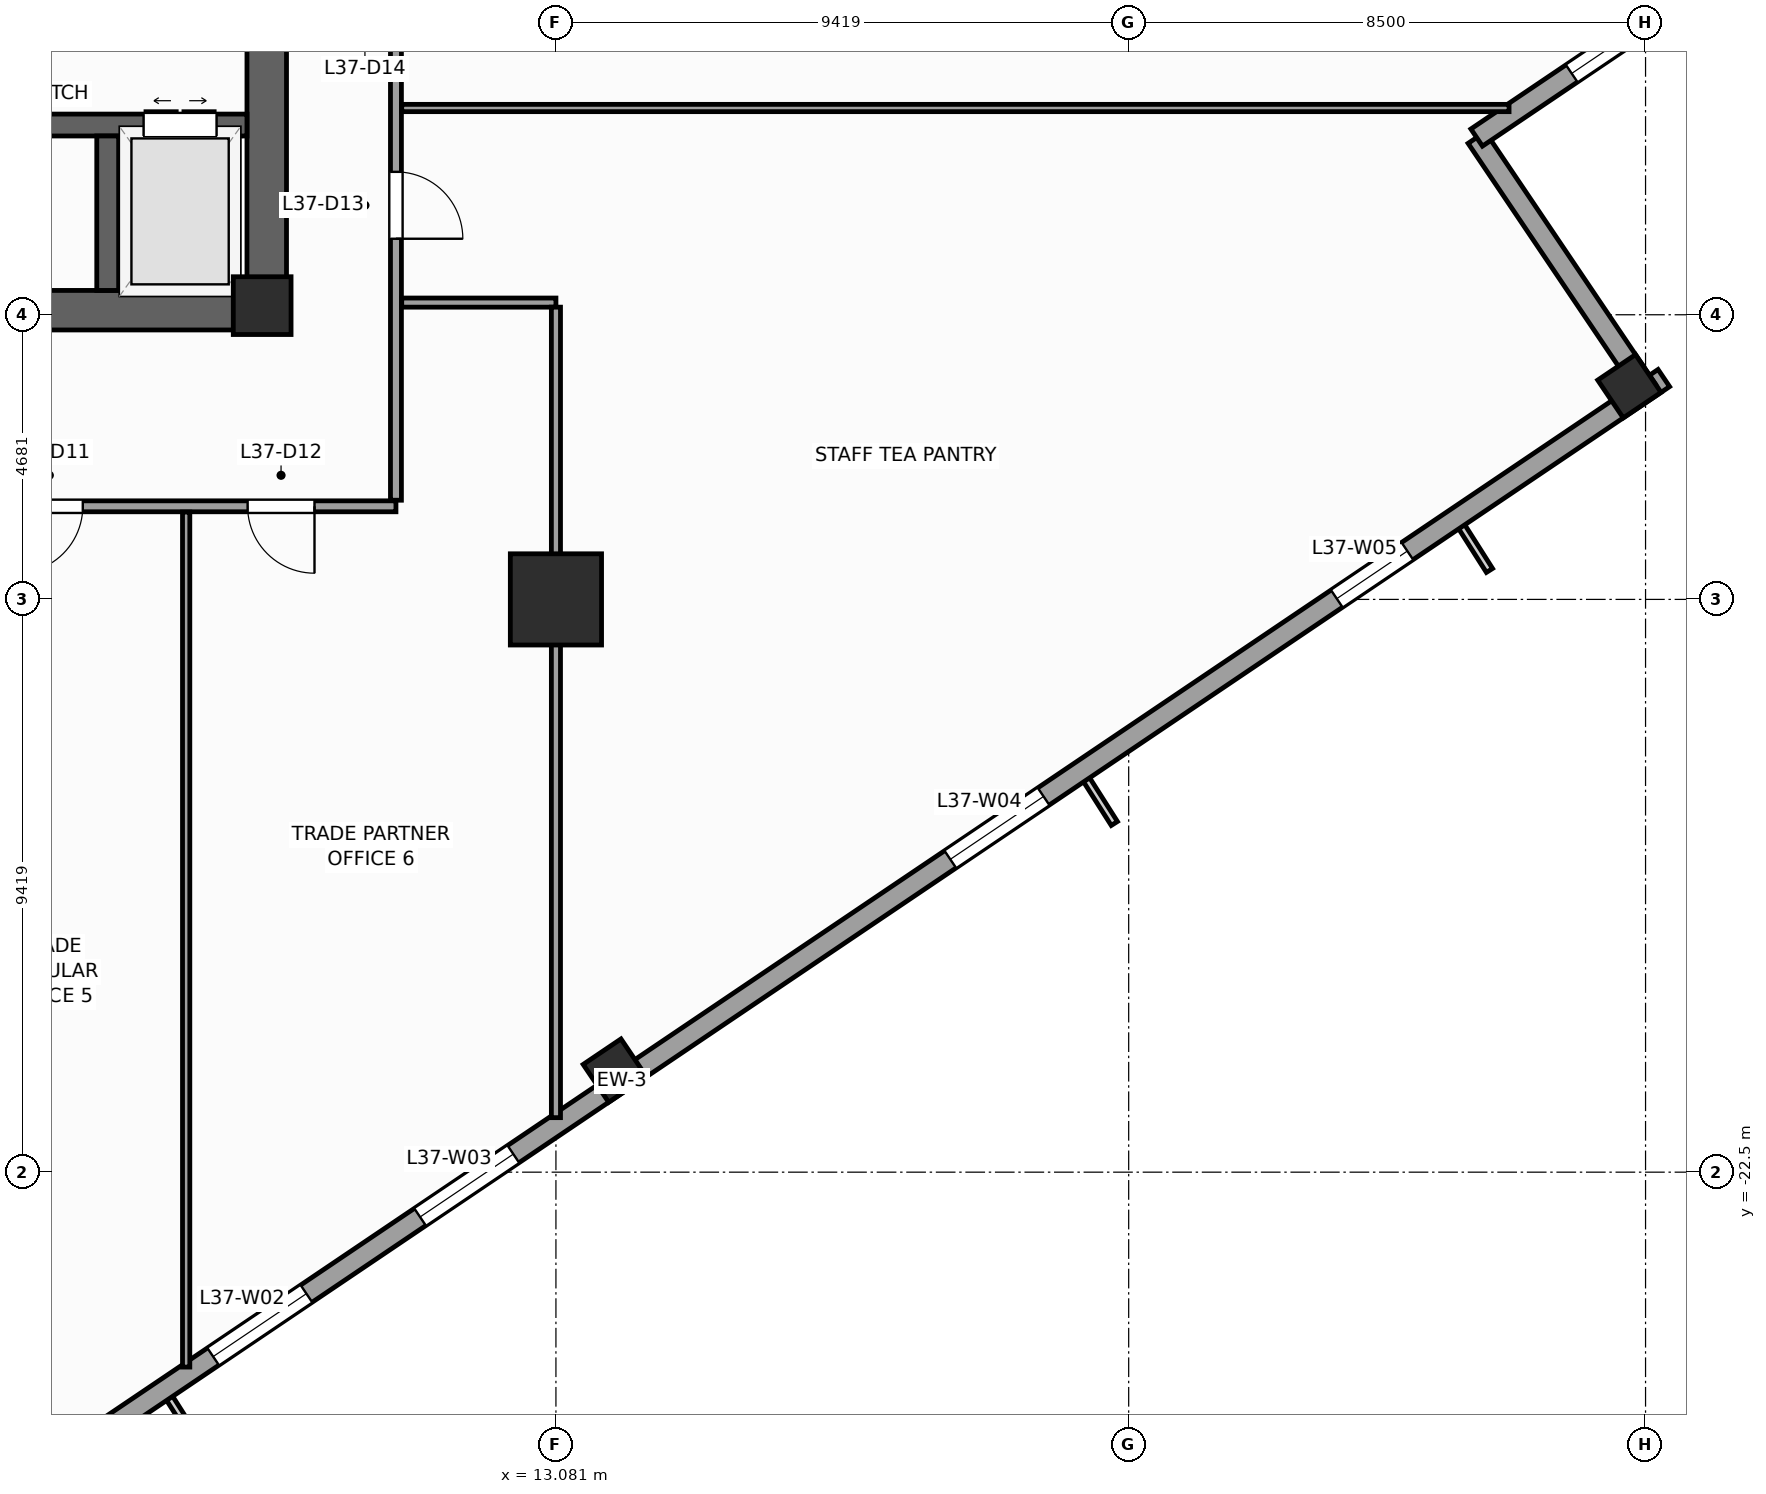
"""IFC4 building model, lengths in metres.
Left out: names, types, materials, properties, quantities, classifications, styles, units other than length and angle.
Written with IfcOpenShell. Run it as: python <this file> out.ifc"""

import sys

from ifc_helpers import new_model, si_unit, direction, frame, frame_2d, origin, origin_2d, place, context, subcontext, project, spatial, rectangle, extrude, source, transform, mapped, element, fill, save


model = new_model("IFC4")
c1 = context("Model", 3, precision=1e-05, world=origin(), true_north=direction((0.0, 1.0)))
c2 = subcontext(c1, "Body", "Model", "MODEL_VIEW")
j1 = project(units=[si_unit("LENGTHUNIT", "METRE"), si_unit("PLANEANGLEUNIT", "RADIAN")], contexts=[c1])
p1 = place(None, origin())
s1 = spatial("IfcSite", under=j1, at=p1, CompositionType="ELEMENT")
p2 = place(p1, origin())
s2 = spatial("IfcBuilding", under=s1, at=p2, CompositionType="ELEMENT")
p3 = place(p2, frame((0.0, 0.0, 156.4)))
s3 = spatial("IfcBuildingStorey", under=s2, at=p3, CompositionType="ELEMENT", Elevation=156.4)
p4 = place(p3, frame((-8.65, -8.325, 0.0), z_axis=(0.0, 0.0, 1.0), x_axis=(1.0, 0.0, 0.0)))
e1 = element("IfcWall", 1, at=p4, inside=s3, PredefinedType="SHEAR", context=c2, shape_type="SweptSolid", body=[
    extrude(rectangle(XDim=17.3, YDim=0.65, at=frame_2d((8.65, 0.0))), origin(), (0.0, 0.0, 1.0), 4.0),
])
p5 = place(p4, frame((8.0, 0.0, 0.0)))
e2 = element("IfcOpeningElement", 2, at=p5, cuts=e1, PredefinedType="OPENING", context=c2, shape_type="SweptSolid", body=[
    extrude(rectangle(XDim=1.3, YDim=2.2, at=frame_2d((0.65, 1.1))), frame((0.0, 0.335, 0.0), z_axis=(0.0, -1.0, 0.0), x_axis=(1.0, 0.0, 0.0)), (0.0, 0.0, 1.0), 0.67),
])
p6 = place(p3, frame((8.325, -8.0, 0.0), z_axis=(0.0, 0.0, 1.0), x_axis=(0.0, 1.0, 0.0)))
e3 = element("IfcWall", 3, at=p6, inside=s3, PredefinedType="SHEAR", context=c2, shape_type="SweptSolid", body=[
    extrude(rectangle(XDim=16.0, YDim=0.65, at=frame_2d((8.0, 0.0))), origin(), (0.0, 0.0, 1.0), 4.0),
])
p7 = place(p6, frame((4.69, 0.0, 0.0)))
e4 = element("IfcOpeningElement", 4, at=p7, cuts=e3, PredefinedType="OPENING", context=c2, shape_type="SweptSolid", body=[
    extrude(rectangle(XDim=1.3, YDim=2.2, at=frame_2d((0.65, 1.1))), frame((0.0, 0.335, 0.0), z_axis=(0.0, -1.0, 0.0), x_axis=(1.0, 0.0, 0.0)), (0.0, 0.0, 1.0), 0.67),
])
p8 = place(p3, frame((4.54, -5.28, 0.0), z_axis=(0.0, 0.0, 1.0), x_axis=(1.0, 0.0, 0.0)))
e5 = element("IfcWall", 5, at=p8, inside=s3, PredefinedType="SHEAR", context=c2, shape_type="SweptSolid", body=[
    extrude(rectangle(XDim=3.46, YDim=0.36, at=frame_2d((1.73, 0.0))), origin(), (0.0, 0.0, 1.0), 4.0),
])
p9 = place(p8, frame((1.76, 0.0, 0.0)))
e6 = element("IfcOpeningElement", 6, at=p9, cuts=e5, PredefinedType="OPENING", context=c2, shape_type="SweptSolid", body=[
    extrude(rectangle(XDim=1.2, YDim=2.25, at=frame_2d((0.6, 1.125))), frame((0.0, 0.19, 0.0), z_axis=(0.0, -1.0, 0.0), x_axis=(1.0, 0.0, 0.0)), (0.0, 0.0, 1.0), 0.38),
])
p10 = place(p3, frame((5.71, -8.0, 0.0), z_axis=(0.0, 0.0, 1.0), x_axis=(0.0, 1.0, 0.0)))
e7 = element("IfcWall", 7, at=p10, inside=s3, PredefinedType="SHEAR", context=c2, shape_type="SweptSolid", body=[
    extrude(rectangle(XDim=2.54, YDim=0.36, at=frame_2d((1.27, 0.0))), origin(), (0.0, 0.0, 1.0), 4.0),
])
m1 = source(origin(), c2, "Body", "SweptSolid", [
    extrude(rectangle(XDim=0.95, YDim=0.95, at=origin_2d()), origin(), (0.0, 0.0, 1.0), 4.0),
])
p11 = place(p3, frame((8.25, -8.25, 0.0), z_axis=(0.0, 0.0, 1.0), x_axis=(1.0, 0.0, 0.0)))
e8 = element("IfcColumn", 8, at=p11, inside=s3, PredefinedType="PILASTER", context=c2, shape_type="MappedRepresentation", body=[
    mapped(m1, transform((0.0, 0.0, 0.0), scale=1.0)),
])
m2 = source(origin(), c2, "Body", "SweptSolid", [
    extrude(rectangle(XDim=1.5, YDim=1.5, at=origin_2d()), origin(), (0.0, 0.0, 1.0), 4.0),
])
p12 = place(p3, frame((13.081, -13.081, 0.0), z_axis=(0.0, 0.0, 1.0), x_axis=(1.0, 0.0, 0.0)))
e9 = element("IfcColumn", 9, at=p12, inside=s3, PredefinedType="COLUMN", context=c2, shape_type="MappedRepresentation", body=[
    mapped(m2, transform((0.0, 0.0, 0.0), scale=1.0)),
])
m3 = source(origin(), c2, "Body", "SweptSolid", [
    extrude(rectangle(XDim=0.75, YDim=0.75, at=origin_2d()), origin(), (0.0, 0.0, 1.0), 4.0),
])
for number, where, z_axis, x_axis in (
    (10, (14.05, -20.83, 0.0), (0.0, 0.0, 1.0), (0.829, 0.559, 0.0)),
    (11, (30.734, -9.576, 0.0), (0.0, 0.0, 1.0), (0.829, 0.559, 0.0)),
):
    element("IfcColumn", number, at=place(p3, frame(where, z_axis=z_axis, x_axis=x_axis)), inside=s3, PredefinedType="COLUMN", context=c2, shape_type="MappedRepresentation", body=[
        mapped(m3, transform((0.0, 0.0, 0.0), scale=1.0)),
    ])
p13 = place(p3, frame((-2.972, -32.558, 0.0), z_axis=(0.0, 0.0, 1.0), x_axis=(0.829036218961, 0.559194910251, 0.0)))
e12 = element("IfcWall", 12, at=p13, inside=s3, PredefinedType="STANDARD", context=c2, shape_type="SweptSolid", body=[
    extrude(rectangle(XDim=41.34, YDim=0.34, at=frame_2d((20.67, 0.0))), origin(), (0.0, 0.0, 1.0), 3.04),
])
p14 = place(p13, frame((4.261, 0.0, 0.56)))
e13 = element("IfcOpeningElement", 13, at=p14, cuts=e12, PredefinedType="OPENING", context=c2, shape_type="SweptSolid", body=[
    extrude(rectangle(XDim=1.4, YDim=2.4, at=frame_2d((0.7, 1.2))), frame((0.0, 0.18, 0.0), z_axis=(0.0, -1.0, 0.0), x_axis=(1.0, 0.0, 0.0)), (0.0, 0.0, 1.0), 0.36),
])
p15 = place(p13, frame((12.564, 0.0, 0.61)))
e14 = element("IfcOpeningElement", 14, at=p15, cuts=e12, PredefinedType="OPENING", context=c2, shape_type="SweptSolid", body=[
    extrude(rectangle(XDim=1.85, YDim=2.35, at=frame_2d((0.925, 1.175))), frame((0.0, 0.18, 0.0), z_axis=(0.0, -1.0, 0.0), x_axis=(1.0, 0.0, 0.0)), (0.0, 0.0, 1.0), 0.36),
])
p16 = place(p13, frame((16.668, 0.0, 0.61)))
e15 = element("IfcOpeningElement", 15, at=p16, cuts=e12, PredefinedType="OPENING", context=c2, shape_type="SweptSolid", body=[
    extrude(rectangle(XDim=1.85, YDim=2.35, at=frame_2d((0.925, 1.175))), frame((0.0, 0.18, 0.0), z_axis=(0.0, -1.0, 0.0), x_axis=(1.0, 0.0, 0.0)), (0.0, 0.0, 1.0), 0.36),
])
p17 = place(p13, frame((27.186, 0.0, 0.61)))
e16 = element("IfcOpeningElement", 16, at=p17, cuts=e12, PredefinedType="OPENING", context=c2, shape_type="SweptSolid", body=[
    extrude(rectangle(XDim=1.85, YDim=2.35, at=frame_2d((0.925, 1.175))), frame((0.0, 0.18, 0.0), z_axis=(0.0, -1.0, 0.0), x_axis=(1.0, 0.0, 0.0)), (0.0, 0.0, 1.0), 0.36),
])
p18 = place(p13, frame((34.852, 0.0, 0.56)))
e17 = element("IfcOpeningElement", 17, at=p18, cuts=e12, PredefinedType="OPENING", context=c2, shape_type="SweptSolid", body=[
    extrude(rectangle(XDim=1.4, YDim=2.4, at=frame_2d((0.7, 1.2))), frame((0.0, 0.18, 0.0), z_axis=(0.0, -1.0, 0.0), x_axis=(1.0, 0.0, 0.0)), (0.0, 0.0, 1.0), 0.36),
])
p19 = place(p3, frame((31.019, -9.631, 0.0), z_axis=(0.0, 0.0, 1.0), x_axis=(-0.559210350234, 0.829025804298, 0.0)))
e18 = element("IfcWall", 18, at=p19, inside=s3, PredefinedType="STANDARD", context=c2, shape_type="SweptSolid", body=[
    extrude(rectangle(XDim=5.0, YDim=0.34, at=frame_2d((2.5, 0.0))), origin(), (0.0, 0.0, 1.0), 3.74),
])
p20 = place(p3, frame((28.223, -5.486, 0.0), z_axis=(0.0, 0.0, 1.0), x_axis=(0.82905227345, 0.559171107879, 0.0)))
e19 = element("IfcWall", 19, at=p20, inside=s3, PredefinedType="STANDARD", context=c2, shape_type="SweptSolid", body=[
    extrude(rectangle(XDim=5.17, YDim=0.34, at=frame_2d((2.585, 0.0))), origin(), (0.0, 0.0, 1.0), 3.04),
])
p21 = place(p20, frame((1.885, 0.0, 0.56)))
e20 = element("IfcOpeningElement", 20, at=p21, cuts=e19, PredefinedType="OPENING", context=c2, shape_type="SweptSolid", body=[
    extrude(rectangle(XDim=1.4, YDim=2.4, at=frame_2d((0.7, 1.2))), frame((0.0, 0.18, 0.0), z_axis=(0.0, -1.0, 0.0), x_axis=(1.0, 0.0, 0.0)), (0.0, 0.0, 1.0), 0.36),
])
p22 = place(p3, frame((-11.55, -11.55, 0.0), z_axis=(0.0, 0.0, 1.0), x_axis=(1.0, 0.0, 0.0)))
e21 = element("IfcWall", 21, at=p22, inside=s3, PredefinedType="PARTITIONING", context=c2, shape_type="SweptSolid", body=[
    extrude(rectangle(XDim=22.0, YDim=0.18, at=frame_2d((11.0, 0.0))), origin(), (0.0, 0.0, 1.0), 3.74),
])
p23 = place(p22, frame((1.58, 0.0, 0.0)))
e22 = element("IfcOpeningElement", 22, at=p23, cuts=e21, PredefinedType="OPENING", context=c2, shape_type="SweptSolid", body=[
    extrude(rectangle(XDim=0.95, YDim=2.1, at=frame_2d((0.475, 1.05))), frame((0.0, 0.1, 0.0), z_axis=(0.0, -1.0, 0.0), x_axis=(1.0, 0.0, 0.0)), (0.0, 0.0, 1.0), 0.2),
])
p24 = place(p22, frame((6.75, 0.0, 0.0)))
e23 = element("IfcOpeningElement", 23, at=p24, cuts=e21, PredefinedType="OPENING", context=c2, shape_type="SweptSolid", body=[
    extrude(rectangle(XDim=1.1, YDim=2.2, at=frame_2d((0.55, 1.1))), frame((0.0, 0.1, 0.0), z_axis=(0.0, -1.0, 0.0), x_axis=(1.0, 0.0, 0.0)), (0.0, 0.0, 1.0), 0.2),
])
p25 = place(p22, frame((11.25, 0.0, 0.0)))
e24 = element("IfcOpeningElement", 24, at=p25, cuts=e21, PredefinedType="OPENING", context=c2, shape_type="SweptSolid", body=[
    extrude(rectangle(XDim=1.1, YDim=2.2, at=frame_2d((0.55, 1.1))), frame((0.0, 0.1, 0.0), z_axis=(0.0, -1.0, 0.0), x_axis=(1.0, 0.0, 0.0)), (0.0, 0.0, 1.0), 0.2),
])
p26 = place(p22, frame((15.75, 0.0, 0.0)))
e25 = element("IfcOpeningElement", 25, at=p26, cuts=e21, PredefinedType="OPENING", context=c2, shape_type="SweptSolid", body=[
    extrude(rectangle(XDim=1.1, YDim=2.2, at=frame_2d((0.55, 1.1))), frame((0.0, 0.1, 0.0), z_axis=(0.0, -1.0, 0.0), x_axis=(1.0, 0.0, 0.0)), (0.0, 0.0, 1.0), 0.2),
])
p27 = place(p22, frame((19.561, 0.0, 0.0)))
e26 = element("IfcOpeningElement", 26, at=p27, cuts=e21, PredefinedType="OPENING", context=c2, shape_type="SweptSolid", body=[
    extrude(rectangle(XDim=1.1, YDim=2.2, at=frame_2d((0.55, 1.1))), frame((0.0, 0.1, 0.0), z_axis=(0.0, -1.0, 0.0), x_axis=(1.0, 0.0, 0.0)), (0.0, 0.0, 1.0), 0.2),
])
p28 = place(p3, frame((10.45, -11.45, 0.0), z_axis=(0.0, 0.0, 1.0), x_axis=(0.0, 1.0, 0.0)))
e27 = element("IfcWall", 27, at=p28, inside=s3, PredefinedType="PARTITIONING", context=c2, shape_type="SweptSolid", body=[
    extrude(rectangle(XDim=10.05, YDim=0.18, at=frame_2d((5.025, 0.0))), origin(), (0.0, 0.0, 1.0), 3.74),
])
p29 = place(p28, frame((4.3, 0.0, 0.0)))
e28 = element("IfcOpeningElement", 28, at=p29, cuts=e27, PredefinedType="OPENING", context=c2, shape_type="SweptSolid", body=[
    extrude(rectangle(XDim=1.1, YDim=2.2, at=frame_2d((0.55, 1.1))), frame((0.0, 0.1, 0.0), z_axis=(0.0, -1.0, 0.0), x_axis=(1.0, 0.0, 0.0)), (0.0, 0.0, 1.0), 0.2),
])
p30 = place(p28, frame((7.536, 0.0, 0.0)))
e29 = element("IfcOpeningElement", 29, at=p30, cuts=e27, PredefinedType="OPENING", context=c2, shape_type="SweptSolid", body=[
    extrude(rectangle(XDim=1.1, YDim=2.2, at=frame_2d((0.55, 1.1))), frame((0.0, 0.1, 0.0), z_axis=(0.0, -1.0, 0.0), x_axis=(1.0, 0.0, 0.0)), (0.0, 0.0, 1.0), 0.2),
])
p31 = place(p3, frame((7.0, -25.705, 0.0), z_axis=(0.0, 0.0, 1.0), x_axis=(0.0, 1.0, 0.0)))
e30 = element("IfcWall", 30, at=p31, inside=s3, PredefinedType="PARTITIONING", context=c2, shape_type="SweptSolid", body=[
    extrude(rectangle(XDim=14.06, YDim=0.12, at=frame_2d((7.03, 0.0))), origin(), (0.0, 0.0, 1.0), 3.74),
])
p32 = place(p3, frame((10.545, -8.2, 0.0), z_axis=(0.0, 0.0, 1.0), x_axis=(1.0, 0.0, 0.0)))
e31 = element("IfcWall", 31, at=p32, inside=s3, PredefinedType="PARTITIONING", context=c2, shape_type="SweptSolid", body=[
    extrude(rectangle(XDim=2.536, YDim=0.15, at=frame_2d((1.268, 0.0))), origin(), (0.0, 0.0, 1.0), 3.74),
])
p33 = place(p3, frame((13.081, -8.275, 0.0), z_axis=(0.0, 0.0, 1.0), x_axis=(0.0, -1.0, 0.0)))
e32 = element("IfcWall", 32, at=p33, inside=s3, PredefinedType="PARTITIONING", context=c2, shape_type="SweptSolid", body=[
    extrude(rectangle(XDim=13.329, YDim=0.15, at=frame_2d((6.664, 0.0))), origin(), (0.0, 0.0, 1.0), 2.84),
])
p34 = place(p3, frame((10.545, -5.0, 0.0), z_axis=(0.0, 0.0, 1.0), x_axis=(1.0, 0.0, 0.0)))
e33 = element("IfcWall", 33, at=p34, inside=s3, PredefinedType="PARTITIONING", context=c2, shape_type="SweptSolid", body=[
    extrude(rectangle(XDim=18.21, YDim=0.12, at=frame_2d((9.105, 0.0))), origin(), (0.0, 0.0, 1.0), 3.74),
])
m4 = source(origin(), c2, "Body", "SweptSolid", [
    extrude(rectangle(XDim=1.85, YDim=2.35, at=frame_2d((0.925, 1.175))), frame((0.0, 0.03, 0.0), z_axis=(0.0, -1.0, 0.0), x_axis=(1.0, 0.0, 0.0)), (0.0, 0.0, 1.0), 0.06),
])
p35 = place(p15, origin())
e34 = element("IfcWindow", 34, at=p35, inside=s3, PartitioningType="SINGLE_PANEL", PredefinedType="WINDOW", context=c2, shape_type="MappedRepresentation", body=[
    mapped(m4, transform((0.0, 0.0, 0.0), scale=1.0)),
])
fill(e14, e34)
p36 = place(p16, origin())
e35 = element("IfcWindow", 35, at=p36, inside=s3, PartitioningType="SINGLE_PANEL", PredefinedType="WINDOW", context=c2, shape_type="MappedRepresentation", body=[
    mapped(m4, transform((0.0, 0.0, 0.0), scale=1.0)),
])
fill(e15, e35)
p37 = place(p17, origin())
e36 = element("IfcWindow", 36, at=p37, inside=s3, PartitioningType="SINGLE_PANEL", PredefinedType="WINDOW", context=c2, shape_type="MappedRepresentation", body=[
    mapped(m4, transform((0.0, 0.0, 0.0), scale=1.0)),
])
fill(e16, e36)
m5 = source(origin(), c2, "Body", "SweptSolid", [
    extrude(rectangle(XDim=1.4, YDim=2.4, at=frame_2d((0.7, 1.2))), frame((0.0, 0.03, 0.0), z_axis=(0.0, -1.0, 0.0), x_axis=(1.0, 0.0, 0.0)), (0.0, 0.0, 1.0), 0.06),
])
p38 = place(p18, origin())
e37 = element("IfcWindow", 37, at=p38, inside=s3, PartitioningType="SINGLE_PANEL", PredefinedType="WINDOW", context=c2, shape_type="MappedRepresentation", body=[
    mapped(m5, transform((0.0, 0.0, 0.0), scale=1.0)),
])
fill(e17, e37)
p39 = place(p21, origin())
e38 = element("IfcWindow", 38, at=p39, inside=s3, PartitioningType="SINGLE_PANEL", PredefinedType="WINDOW", context=c2, shape_type="MappedRepresentation", body=[
    mapped(m5, transform((0.0, 0.0, 0.0), scale=1.0)),
])
fill(e20, e38)
m6 = source(origin(), c2, "Body", "SweptSolid", [
    extrude(rectangle(XDim=1.2, YDim=2.25, at=frame_2d((0.6, 1.125))), frame((0.0, 0.025, 0.0), z_axis=(0.0, -1.0, 0.0), x_axis=(1.0, 0.0, 0.0)), (0.0, 0.0, 1.0), 0.05),
])
p40 = place(p9, origin())
e39 = element("IfcDoor", 39, at=p40, inside=s3, OperationType="DOUBLE_DOOR_SLIDING", PredefinedType="DOOR", context=c2, shape_type="MappedRepresentation", body=[
    mapped(m6, transform((0.0, 0.0, 0.0), scale=1.0)),
])
fill(e6, e39)
m7 = source(origin(), c2, "Body", "SweptSolid", [
    extrude(rectangle(XDim=1.1, YDim=2.2, at=frame_2d((0.55, 1.1))), frame((0.0, 0.025, 0.0), z_axis=(0.0, -1.0, 0.0), x_axis=(1.0, 0.0, 0.0)), (0.0, 0.0, 1.0), 0.05),
])
p41 = place(p26, frame((1.1, 0.0, 0.0), z_axis=(0.0, 0.0, 1.0), x_axis=(-1.0, 0.0, 0.0)))
e40 = element("IfcDoor", 40, at=p41, inside=s3, OperationType="SINGLE_SWING_LEFT", PredefinedType="DOOR", context=c2, shape_type="MappedRepresentation", body=[
    mapped(m7, transform((0.0, 0.0, 0.0), scale=1.0)),
])
fill(e25, e40)
p42 = place(p27, frame((1.1, 0.0, 0.0), z_axis=(0.0, 0.0, 1.0), x_axis=(-1.0, 0.0, 0.0)))
e41 = element("IfcDoor", 41, at=p42, inside=s3, OperationType="SINGLE_SWING_RIGHT", PredefinedType="DOOR", context=c2, shape_type="MappedRepresentation", body=[
    mapped(m7, transform((0.0, 0.0, 0.0), scale=1.0)),
])
fill(e26, e41)
p43 = place(p29, frame((1.1, 0.0, 0.0), z_axis=(0.0, 0.0, 1.0), x_axis=(-1.0, 0.0, 0.0)))
e42 = element("IfcDoor", 42, at=p43, inside=s3, OperationType="SINGLE_SWING_LEFT", PredefinedType="DOOR", context=c2, shape_type="MappedRepresentation", body=[
    mapped(m7, transform((0.0, 0.0, 0.0), scale=1.0)),
])
fill(e28, e42)
save(model, sys.argv[1])
